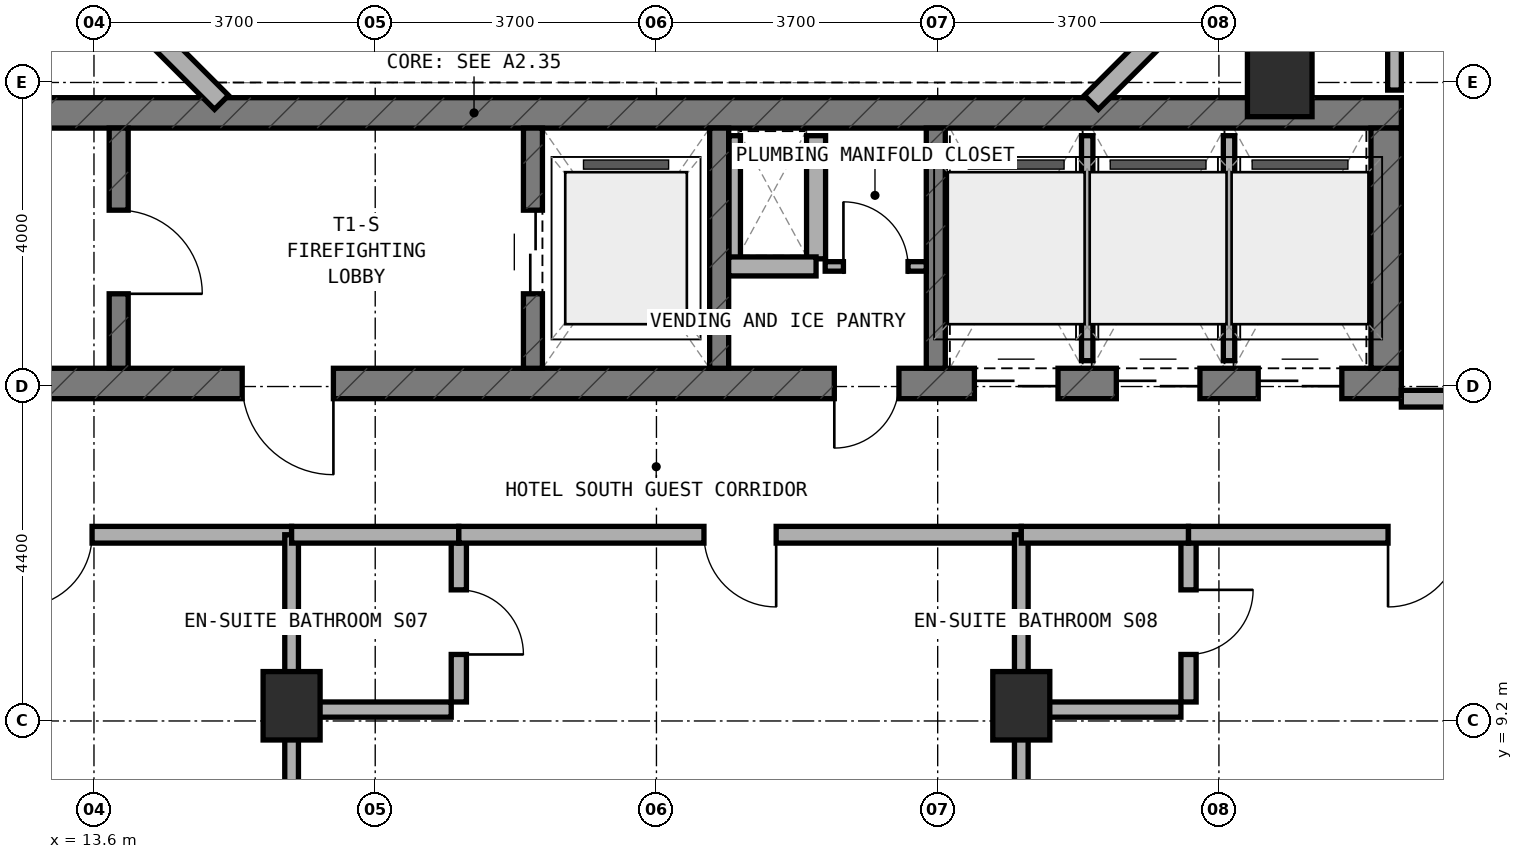
"""IFC4 building model, lengths in metres.
Left out: names, types, materials, properties, quantities, classifications, styles, units other than length and angle.
Written with IfcOpenShell. Run it as: python <this file> out.ifc"""

import sys

from ifc_helpers import new_model, si_unit, direction, frame, frame_2d, origin, origin_2d, place, context, subcontext, project, spatial, rectangle, extrude, element, fill, save


model = new_model("IFC4")
c1 = context("Model", 3, precision=1e-05, world=origin(), true_north=direction((0.0, 1.0)))
c2 = subcontext(c1, "Body", "Model", "MODEL_VIEW")
j1 = project(units=[si_unit("LENGTHUNIT", "METRE"), si_unit("PLANEANGLEUNIT", "RADIAN")], contexts=[c1])
p1 = place(None, origin())
s1 = spatial("IfcSite", under=j1, at=p1, CompositionType="ELEMENT")
p2 = place(p1, origin())
s2 = spatial("IfcBuilding", under=s1, at=p2, CompositionType="ELEMENT")
p3 = place(p2, frame((0.0, 0.0, 155.5)))
s3 = spatial("IfcBuildingStorey", under=s2, at=p3, CompositionType="ELEMENT", Elevation=155.5)
p4 = place(p3, frame((6.4, 13.64, 0.0), z_axis=(0.0, 0.0, 1.0), x_axis=(1.0, 0.0, 0.0)))
e1 = element("IfcWall", 1, at=p4, inside=s3, PredefinedType="SHEAR", context=c2, shape_type="SweptSolid", body=[
    extrude(rectangle(XDim=24.4, YDim=0.4, at=frame_2d((12.2, 0.0))), origin(), (0.0, 0.0, 1.0), 3.5),
])
p5 = place(p4, frame((9.15, 0.0, 0.0)))
e2 = element("IfcOpeningElement", 2, at=p5, cuts=e1, PredefinedType="OPENING", context=c2, shape_type="SweptSolid", body=[
    extrude(rectangle(XDim=1.2, YDim=2.15, at=frame_2d((0.6, 1.075))), frame((0.0, 0.21, 0.0), z_axis=(0.0, -1.0, 0.0), x_axis=(1.0, 0.0, 0.0)), (0.0, 0.0, 1.0), 0.42),
])
p6 = place(p4, frame((16.94, 0.0, 0.0)))
e3 = element("IfcOpeningElement", 3, at=p6, cuts=e1, PredefinedType="OPENING", context=c2, shape_type="SweptSolid", body=[
    extrude(rectangle(XDim=0.85, YDim=2.1, at=frame_2d((0.425, 1.05))), frame((0.0, 0.21, 0.0), z_axis=(0.0, -1.0, 0.0), x_axis=(1.0, 0.0, 0.0)), (0.0, 0.0, 1.0), 0.42),
])
p7 = place(p4, frame((18.783, 0.0, 0.0)))
e4 = element("IfcOpeningElement", 4, at=p7, cuts=e1, PredefinedType="OPENING", context=c2, shape_type="SweptSolid", body=[
    extrude(rectangle(XDim=1.1, YDim=2.15, at=frame_2d((0.55, 1.075))), frame((0.0, 0.21, 0.0), z_axis=(0.0, -1.0, 0.0), x_axis=(1.0, 0.0, 0.0)), (0.0, 0.0, 1.0), 0.42),
])
p8 = place(p4, frame((20.65, 0.0, 0.0)))
e5 = element("IfcOpeningElement", 5, at=p8, cuts=e1, PredefinedType="OPENING", context=c2, shape_type="SweptSolid", body=[
    extrude(rectangle(XDim=1.1, YDim=2.15, at=frame_2d((0.55, 1.075))), frame((0.0, 0.21, 0.0), z_axis=(0.0, -1.0, 0.0), x_axis=(1.0, 0.0, 0.0)), (0.0, 0.0, 1.0), 0.42),
])
p9 = place(p4, frame((22.517, 0.0, 0.0)))
e6 = element("IfcOpeningElement", 6, at=p9, cuts=e1, PredefinedType="OPENING", context=c2, shape_type="SweptSolid", body=[
    extrude(rectangle(XDim=1.1, YDim=2.15, at=frame_2d((0.55, 1.075))), frame((0.0, 0.21, 0.0), z_axis=(0.0, -1.0, 0.0), x_axis=(1.0, 0.0, 0.0)), (0.0, 0.0, 1.0), 0.42),
])
p10 = place(p3, frame((6.4, 17.2, 0.0), z_axis=(0.0, 0.0, 1.0), x_axis=(1.0, 0.0, 0.0)))
e7 = element("IfcWall", 7, at=p10, inside=s3, PredefinedType="SHEAR", context=c2, shape_type="SweptSolid", body=[
    extrude(rectangle(XDim=24.4, YDim=0.4, at=frame_2d((12.2, 0.0))), origin(), (0.0, 0.0, 1.0), 3.5),
])
p11 = place(p3, frame((30.6, 13.84, 0.0), z_axis=(0.0, 0.0, 1.0), x_axis=(0.0, 1.0, 0.0)))
e8 = element("IfcWall", 8, at=p11, inside=s3, PredefinedType="SHEAR", context=c2, shape_type="SweptSolid", body=[
    extrude(rectangle(XDim=3.16, YDim=0.4, at=frame_2d((1.58, 0.0))), origin(), (0.0, 0.0, 1.0), 3.5),
])
p12 = place(p3, frame((13.925, 13.84, 0.0), z_axis=(0.0, 0.0, 1.0), x_axis=(0.0, 1.0, 0.0)))
e9 = element("IfcWall", 9, at=p12, inside=s3, PredefinedType="STANDARD", context=c2, shape_type="SweptSolid", body=[
    extrude(rectangle(XDim=3.16, YDim=0.25, at=frame_2d((1.58, 0.0))), origin(), (0.0, 0.0, 1.0), 3.22),
])
p13 = place(p12, frame((0.98, 0.0, 0.0)))
e10 = element("IfcOpeningElement", 10, at=p13, cuts=e9, PredefinedType="OPENING", context=c2, shape_type="SweptSolid", body=[
    extrude(rectangle(XDim=1.1, YDim=2.15, at=frame_2d((0.55, 1.075))), frame((0.0, 0.135, 0.0), z_axis=(0.0, -1.0, 0.0), x_axis=(1.0, 0.0, 0.0)), (0.0, 0.0, 1.0), 0.27),
])
p14 = place(p3, frame((19.375, 13.84, 0.0), z_axis=(0.0, 0.0, 1.0), x_axis=(0.0, 1.0, 0.0)))
e11 = element("IfcWall", 11, at=p14, inside=s3, PredefinedType="STANDARD", context=c2, shape_type="SweptSolid", body=[
    extrude(rectangle(XDim=3.16, YDim=0.25, at=frame_2d((1.58, 0.0))), origin(), (0.0, 0.0, 1.0), 3.22),
])
p15 = place(p14, frame((0.98, 0.0, 0.0)))
e12 = element("IfcOpeningElement", 12, at=p15, cuts=e11, PredefinedType="OPENING", context=c2, shape_type="SweptSolid", body=[
    extrude(rectangle(XDim=1.1, YDim=2.15, at=frame_2d((0.55, 1.075))), frame((0.0, 0.135, 0.0), z_axis=(0.0, -1.0, 0.0), x_axis=(1.0, 0.0, 0.0)), (0.0, 0.0, 1.0), 0.27),
])
for number, where, z_axis, x_axis in (
    (13, (21.825, 13.84, 0.0), (0.0, 0.0, 1.0), (0.0, 1.0, 0.0)),
    (14, (24.675, 13.84, 0.0), (0.0, 0.0, 1.0), (0.0, 1.0, 0.0)),
):
    element("IfcWall", number, at=place(p3, frame(where, z_axis=z_axis, x_axis=x_axis)), inside=s3, PredefinedType="STANDARD", context=c2, shape_type="SweptSolid", body=[
        extrude(rectangle(XDim=3.16, YDim=0.25, at=frame_2d((1.58, 0.0))), origin(), (0.0, 0.0, 1.0), 3.22),
    ])
for number, where, z_axis, x_axis in (
    (15, (16.2, 9.4, 0.0), (0.0, 0.0, 1.0), (1.0, 0.0, 0.0)),
    (16, (25.8, 9.4, 0.0), (0.0, 0.0, 1.0), (1.0, 0.0, 0.0)),
):
    element("IfcColumn", number, at=place(p3, frame(where, z_axis=z_axis, x_axis=x_axis)), inside=s3, PredefinedType="COLUMN", context=c2, shape_type="SweptSolid", body=[
        extrude(rectangle(XDim=0.75, YDim=0.9, at=origin_2d()), origin(), (0.0, 0.0, 1.0), 3.5),
    ])
p16 = place(p3, frame((29.2, 17.65, 0.0), z_axis=(0.0, 0.0, 1.0), x_axis=(1.0, 0.0, 0.0)))
e17 = element("IfcColumn", 17, at=p16, inside=s3, PredefinedType="COLUMN", context=c2, shape_type="SweptSolid", body=[
    extrude(rectangle(XDim=0.85, YDim=1.0, at=origin_2d()), origin(), (0.0, 0.0, 1.0), 3.5),
])
for number, where, z_axis, x_axis in (
    (18, (26.722, 17.338, 0.0), (0.0, 0.0, 1.0), (0.707, 0.707, 0.0)),
    (19, (13.444, 19.172, 0.0), (0.0, 0.0, 1.0), (0.707, -0.707, 0.0)),
):
    element("IfcWall", number, at=place(p3, frame(where, z_axis=z_axis, x_axis=x_axis)), inside=s3, PredefinedType="STANDARD", context=c2, shape_type="SweptSolid", body=[
        extrude(rectangle(XDim=2.594, YDim=0.26, at=frame_2d((1.297, 0.0))), origin(), (0.0, 0.0, 1.0), 3.22),
    ])
p17 = place(p3, frame((22.03, 15.28, 0.0), z_axis=(0.0, 0.0, 1.0), x_axis=(0.0, 1.0, 0.0)))
e20 = element("IfcWall", 20, at=p17, inside=s3, PredefinedType="PARTITIONING", context=c2, shape_type="SweptSolid", body=[
    extrude(rectangle(XDim=1.62, YDim=0.15, at=frame_2d((0.81, 0.0))), origin(), (0.0, 0.0, 1.0), 3.22),
])
p18 = place(p3, frame((23.1, 15.28, 0.0), z_axis=(0.0, 0.0, 1.0), x_axis=(0.0, 1.0, 0.0)))
e21 = element("IfcWall", 21, at=p18, inside=s3, PredefinedType="SOLIDWALL", context=c2, shape_type="SweptSolid", body=[
    extrude(rectangle(XDim=1.62, YDim=0.25, at=frame_2d((0.81, 0.0))), origin(), (0.0, 0.0, 1.0), 3.22),
])
p19 = place(p3, frame((21.95, 15.18, 0.0), z_axis=(0.0, 0.0, 1.0), x_axis=(1.0, 0.0, 0.0)))
e22 = element("IfcWall", 22, at=p19, inside=s3, PredefinedType="SOLIDWALL", context=c2, shape_type="SweptSolid", body=[
    extrude(rectangle(XDim=1.15, YDim=0.25, at=frame_2d((0.575, 0.0))), origin(), (0.0, 0.0, 1.0), 3.22),
])
p20 = place(p3, frame((23.22, 15.18, 0.0), z_axis=(0.0, 0.0, 1.0), x_axis=(1.0, 0.0, 0.0)))
e23 = element("IfcWall", 23, at=p20, inside=s3, PredefinedType="PARTITIONING", context=c2, shape_type="SweptSolid", body=[
    extrude(rectangle(XDim=1.33, YDim=0.125, at=frame_2d((0.665, 0.0))), origin(), (0.0, 0.0, 1.0), 3.22),
])
p21 = place(p20, frame((0.24, 0.0, 0.0)))
e24 = element("IfcOpeningElement", 24, at=p21, cuts=e23, PredefinedType="OPENING", context=c2, shape_type="SweptSolid", body=[
    extrude(rectangle(XDim=0.85, YDim=2.1, at=frame_2d((0.425, 1.05))), frame((0.0, 0.073, 0.0), z_axis=(0.0, -1.0, 0.0), x_axis=(1.0, 0.0, 0.0)), (0.0, 0.0, 1.0), 0.145),
])
p22 = place(p3, frame((26.667, 13.94, 0.0), z_axis=(0.0, 0.0, 1.0), x_axis=(0.0, 1.0, 0.0)))
e25 = element("IfcWall", 25, at=p22, inside=s3, PredefinedType="PARTITIONING", context=c2, shape_type="SweptSolid", body=[
    extrude(rectangle(XDim=2.96, YDim=0.15, at=frame_2d((1.48, 0.0))), origin(), (0.0, 0.0, 1.0), 3.22),
])
p23 = place(p3, frame((28.533, 13.94, 0.0), z_axis=(0.0, 0.0, 1.0), x_axis=(0.0, 1.0, 0.0)))
e26 = element("IfcWall", 26, at=p23, inside=s3, PredefinedType="PARTITIONING", context=c2, shape_type="SweptSolid", body=[
    extrude(rectangle(XDim=2.96, YDim=0.15, at=frame_2d((1.48, 0.0))), origin(), (0.0, 0.0, 1.0), 2.795),
])
p24 = place(p3, frame((10.0, 11.65, 0.0), z_axis=(0.0, 0.0, 1.0), x_axis=(1.0, 0.0, 0.0)))
e27 = element("IfcWall", 27, at=p24, inside=s3, PredefinedType="SOLIDWALL", context=c2, shape_type="SweptSolid", body=[
    extrude(rectangle(XDim=6.2, YDim=0.22, at=frame_2d((3.1, 0.0))), origin(), (0.0, 0.0, 1.0), 2.795),
])
p25 = place(p24, frame((2.625, 0.0, 0.0)))
e28 = element("IfcOpeningElement", 28, at=p25, cuts=e27, PredefinedType="OPENING", context=c2, shape_type="SweptSolid", body=[
    extrude(rectangle(XDim=0.95, YDim=2.1, at=frame_2d((0.475, 1.05))), frame((0.0, 0.12, 0.0), z_axis=(0.0, -1.0, 0.0), x_axis=(1.0, 0.0, 0.0)), (0.0, 0.0, 1.0), 0.24),
])
p26 = place(p3, frame((16.2, 4.86, 0.0), z_axis=(0.0, 0.0, 1.0), x_axis=(0.0, 1.0, 0.0)))
e29 = element("IfcWall", 29, at=p26, inside=s3, PredefinedType="SOLIDWALL", context=c2, shape_type="SweptSolid", body=[
    extrude(rectangle(XDim=6.79, YDim=0.18, at=frame_2d((3.395, 0.0))), origin(), (0.0, 0.0, 1.0), 2.795),
])
p27 = place(p3, frame((18.4, 9.45, 0.0), z_axis=(0.0, 0.0, 1.0), x_axis=(0.0, 1.0, 0.0)))
e30 = element("IfcWall", 30, at=p27, inside=s3, PredefinedType="PLUMBINGWALL", context=c2, shape_type="SweptSolid", body=[
    extrude(rectangle(XDim=2.1, YDim=0.2, at=frame_2d((1.05, 0.0))), origin(), (0.0, 0.0, 1.0), 2.795),
])
p28 = place(p27, frame((0.625, 0.0, 0.0)))
e31 = element("IfcOpeningElement", 31, at=p28, cuts=e30, PredefinedType="OPENING", context=c2, shape_type="SweptSolid", body=[
    extrude(rectangle(XDim=0.85, YDim=2.1, at=frame_2d((0.425, 1.05))), frame((0.0, 0.11, 0.0), z_axis=(0.0, -1.0, 0.0), x_axis=(1.0, 0.0, 0.0)), (0.0, 0.0, 1.0), 0.22),
])
p29 = place(p3, frame((16.3, 9.35, 0.0), z_axis=(0.0, 0.0, 1.0), x_axis=(1.0, 0.0, 0.0)))
e32 = element("IfcWall", 32, at=p29, inside=s3, PredefinedType="PLUMBINGWALL", context=c2, shape_type="SweptSolid", body=[
    extrude(rectangle(XDim=2.0, YDim=0.2, at=frame_2d((1.0, 0.0))), origin(), (0.0, 0.0, 1.0), 2.835),
])
p30 = place(p3, frame((16.2, 11.65, 0.0), z_axis=(0.0, 0.0, 1.0), x_axis=(1.0, 0.0, 0.0)))
e33 = element("IfcWall", 33, at=p30, inside=s3, PredefinedType="SOLIDWALL", context=c2, shape_type="SweptSolid", body=[
    extrude(rectangle(XDim=2.2, YDim=0.22, at=frame_2d((1.1, 0.0))), origin(), (0.0, 0.0, 1.0), 2.795),
])
p31 = place(p3, frame((18.4, 11.65, 0.0), z_axis=(0.0, 0.0, 1.0), x_axis=(1.0, 0.0, 0.0)))
e34 = element("IfcWall", 34, at=p31, inside=s3, PredefinedType="SOLIDWALL", context=c2, shape_type="SweptSolid", body=[
    extrude(rectangle(XDim=7.4, YDim=0.22, at=frame_2d((3.7, 0.0))), origin(), (0.0, 0.0, 1.0), 2.795),
])
p32 = place(p31, frame((3.225, 0.0, 0.0)))
e35 = element("IfcOpeningElement", 35, at=p32, cuts=e34, PredefinedType="OPENING", context=c2, shape_type="SweptSolid", body=[
    extrude(rectangle(XDim=0.95, YDim=2.1, at=frame_2d((0.475, 1.05))), frame((0.0, 0.12, 0.0), z_axis=(0.0, -1.0, 0.0), x_axis=(1.0, 0.0, 0.0)), (0.0, 0.0, 1.0), 0.24),
])
p33 = place(p3, frame((25.8, 4.86, 0.0), z_axis=(0.0, 0.0, 1.0), x_axis=(0.0, 1.0, 0.0)))
e36 = element("IfcWall", 36, at=p33, inside=s3, PredefinedType="SOLIDWALL", context=c2, shape_type="SweptSolid", body=[
    extrude(rectangle(XDim=6.79, YDim=0.18, at=frame_2d((3.395, 0.0))), origin(), (0.0, 0.0, 1.0), 2.795),
])
p34 = place(p3, frame((28.0, 9.45, 0.0), z_axis=(0.0, 0.0, 1.0), x_axis=(0.0, 1.0, 0.0)))
e37 = element("IfcWall", 37, at=p34, inside=s3, PredefinedType="PLUMBINGWALL", context=c2, shape_type="SweptSolid", body=[
    extrude(rectangle(XDim=2.1, YDim=0.2, at=frame_2d((1.05, 0.0))), origin(), (0.0, 0.0, 1.0), 2.795),
])
p35 = place(p34, frame((0.625, 0.0, 0.0)))
e38 = element("IfcOpeningElement", 38, at=p35, cuts=e37, PredefinedType="OPENING", context=c2, shape_type="SweptSolid", body=[
    extrude(rectangle(XDim=0.85, YDim=2.1, at=frame_2d((0.425, 1.05))), frame((0.0, 0.11, 0.0), z_axis=(0.0, -1.0, 0.0), x_axis=(1.0, 0.0, 0.0)), (0.0, 0.0, 1.0), 0.22),
])
p36 = place(p3, frame((25.9, 9.35, 0.0), z_axis=(0.0, 0.0, 1.0), x_axis=(1.0, 0.0, 0.0)))
e39 = element("IfcWall", 39, at=p36, inside=s3, PredefinedType="PLUMBINGWALL", context=c2, shape_type="SweptSolid", body=[
    extrude(rectangle(XDim=2.0, YDim=0.2, at=frame_2d((1.0, 0.0))), origin(), (0.0, 0.0, 1.0), 2.835),
])
p37 = place(p3, frame((25.8, 11.65, 0.0), z_axis=(0.0, 0.0, 1.0), x_axis=(1.0, 0.0, 0.0)))
e40 = element("IfcWall", 40, at=p37, inside=s3, PredefinedType="SOLIDWALL", context=c2, shape_type="SweptSolid", body=[
    extrude(rectangle(XDim=2.2, YDim=0.22, at=frame_2d((1.1, 0.0))), origin(), (0.0, 0.0, 1.0), 2.795),
])
p38 = place(p3, frame((28.0, 11.65, 0.0), z_axis=(0.0, 0.0, 1.0), x_axis=(1.0, 0.0, 0.0)))
e41 = element("IfcWall", 41, at=p38, inside=s3, PredefinedType="SOLIDWALL", context=c2, shape_type="SweptSolid", body=[
    extrude(rectangle(XDim=6.2, YDim=0.22, at=frame_2d((3.1, 0.0))), origin(), (0.0, 0.0, 1.0), 2.795),
])
p39 = place(p38, frame((2.625, 0.0, 0.0)))
e42 = element("IfcOpeningElement", 42, at=p39, cuts=e41, PredefinedType="OPENING", context=c2, shape_type="SweptSolid", body=[
    extrude(rectangle(XDim=0.95, YDim=2.1, at=frame_2d((0.475, 1.05))), frame((0.0, 0.12, 0.0), z_axis=(0.0, -1.0, 0.0), x_axis=(1.0, 0.0, 0.0)), (0.0, 0.0, 1.0), 0.24),
])
p40 = place(p3, frame((30.71, 17.5, 0.0), z_axis=(0.0, 0.0, 1.0), x_axis=(0.0, 1.0, 0.0)))
e43 = element("IfcWall", 43, at=p40, inside=s3, PredefinedType="SOLIDWALL", context=c2, shape_type="SweptSolid", body=[
    extrude(rectangle(XDim=15.0, YDim=0.18, at=frame_2d((7.5, 0.0))), origin(), (0.0, 0.0, 1.0), 2.795),
])
p41 = place(p3, frame((30.8, 13.44, 0.0), z_axis=(0.0, 0.0, 1.0), x_axis=(1.0, 0.0, 0.0)))
e44 = element("IfcWall", 44, at=p41, inside=s3, PredefinedType="SOLIDWALL", context=c2, shape_type="SweptSolid", body=[
    extrude(rectangle(XDim=5.65, YDim=0.22, at=frame_2d((2.825, 0.0))), origin(), (0.0, 0.0, 1.0), 2.795),
])
p42 = place(p41, frame((2.35, 0.0, 0.0)))
e45 = element("IfcOpeningElement", 45, at=p42, cuts=e44, PredefinedType="OPENING", context=c2, shape_type="SweptSolid", body=[
    extrude(rectangle(XDim=0.95, YDim=2.1, at=frame_2d((0.475, 1.05))), frame((0.0, 0.12, 0.0), z_axis=(0.0, -1.0, 0.0), x_axis=(1.0, 0.0, 0.0)), (0.0, 0.0, 1.0), 0.24),
])
p43 = place(p13, frame((1.1, 0.0, 0.0), z_axis=(0.0, 0.0, 1.0), x_axis=(-1.0, 0.0, 0.0)))
e46 = element("IfcDoor", 46, at=p43, inside=s3, OperationType="SINGLE_SWING_RIGHT", PredefinedType="DOOR", context=c2, shape_type="SweptSolid", body=[
    extrude(rectangle(XDim=1.1, YDim=2.15, at=frame_2d((0.55, 1.075))), frame((0.0, 0.025, 0.0), z_axis=(0.0, -1.0, 0.0), x_axis=(1.0, 0.0, 0.0)), (0.0, 0.0, 1.0), 0.05),
])
fill(e10, e46)
p44 = place(p5, frame((1.2, 0.0, 0.0), z_axis=(0.0, 0.0, 1.0), x_axis=(-1.0, 0.0, 0.0)))
e47 = element("IfcDoor", 47, at=p44, inside=s3, OperationType="SINGLE_SWING_LEFT", PredefinedType="DOOR", context=c2, shape_type="SweptSolid", body=[
    extrude(rectangle(XDim=1.2, YDim=2.15, at=frame_2d((0.6, 1.075))), frame((0.0, 0.025, 0.0), z_axis=(0.0, -1.0, 0.0), x_axis=(1.0, 0.0, 0.0)), (0.0, 0.0, 1.0), 0.05),
])
fill(e2, e47)
p45 = place(p15, origin())
e48 = element("IfcDoor", 48, at=p45, inside=s3, OperationType="DOUBLE_DOOR_SLIDING", PredefinedType="DOOR", context=c2, shape_type="SweptSolid", body=[
    extrude(rectangle(XDim=1.1, YDim=2.15, at=frame_2d((0.55, 1.075))), frame((0.0, 0.025, 0.0), z_axis=(0.0, -1.0, 0.0), x_axis=(1.0, 0.0, 0.0)), (0.0, 0.0, 1.0), 0.05),
])
fill(e12, e48)
p46 = place(p6, frame((0.85, 0.0, 0.0), z_axis=(0.0, 0.0, 1.0), x_axis=(-1.0, 0.0, 0.0)))
e49 = element("IfcDoor", 49, at=p46, inside=s3, OperationType="SINGLE_SWING_RIGHT", PredefinedType="DOOR", context=c2, shape_type="SweptSolid", body=[
    extrude(rectangle(XDim=0.85, YDim=2.1, at=frame_2d((0.425, 1.05))), frame((0.0, 0.025, 0.0), z_axis=(0.0, -1.0, 0.0), x_axis=(1.0, 0.0, 0.0)), (0.0, 0.0, 1.0), 0.05),
])
fill(e3, e49)
p47 = place(p7, frame((1.1, 0.0, 0.0), z_axis=(0.0, 0.0, 1.0), x_axis=(-1.0, 0.0, 0.0)))
e50 = element("IfcDoor", 50, at=p47, inside=s3, OperationType="DOUBLE_DOOR_SLIDING", PredefinedType="DOOR", context=c2, shape_type="SweptSolid", body=[
    extrude(rectangle(XDim=1.1, YDim=2.15, at=frame_2d((0.55, 1.075))), frame((0.0, 0.025, 0.0), z_axis=(0.0, -1.0, 0.0), x_axis=(1.0, 0.0, 0.0)), (0.0, 0.0, 1.0), 0.05),
])
fill(e4, e50)
p48 = place(p8, frame((1.1, 0.0, 0.0), z_axis=(0.0, 0.0, 1.0), x_axis=(-1.0, 0.0, 0.0)))
e51 = element("IfcDoor", 51, at=p48, inside=s3, OperationType="DOUBLE_DOOR_SLIDING", PredefinedType="DOOR", context=c2, shape_type="SweptSolid", body=[
    extrude(rectangle(XDim=1.1, YDim=2.15, at=frame_2d((0.55, 1.075))), frame((0.0, 0.025, 0.0), z_axis=(0.0, -1.0, 0.0), x_axis=(1.0, 0.0, 0.0)), (0.0, 0.0, 1.0), 0.05),
])
fill(e5, e51)
p49 = place(p9, frame((1.1, 0.0, 0.0), z_axis=(0.0, 0.0, 1.0), x_axis=(-1.0, 0.0, 0.0)))
e52 = element("IfcDoor", 52, at=p49, inside=s3, OperationType="DOUBLE_DOOR_SLIDING", PredefinedType="DOOR", context=c2, shape_type="SweptSolid", body=[
    extrude(rectangle(XDim=1.1, YDim=2.15, at=frame_2d((0.55, 1.075))), frame((0.0, 0.025, 0.0), z_axis=(0.0, -1.0, 0.0), x_axis=(1.0, 0.0, 0.0)), (0.0, 0.0, 1.0), 0.05),
])
fill(e6, e52)
p50 = place(p21, origin())
e53 = element("IfcDoor", 53, at=p50, inside=s3, OperationType="SINGLE_SWING_LEFT", PredefinedType="DOOR", context=c2, shape_type="SweptSolid", body=[
    extrude(rectangle(XDim=0.85, YDim=2.1, at=frame_2d((0.425, 1.05))), frame((0.0, 0.025, 0.0), z_axis=(0.0, -1.0, 0.0), x_axis=(1.0, 0.0, 0.0)), (0.0, 0.0, 1.0), 0.05),
])
fill(e24, e53)
p51 = place(p25, frame((0.95, 0.0, 0.0), z_axis=(0.0, 0.0, 1.0), x_axis=(-1.0, 0.0, 0.0)))
e54 = element("IfcDoor", 54, at=p51, inside=s3, OperationType="SINGLE_SWING_RIGHT", PredefinedType="DOOR", context=c2, shape_type="SweptSolid", body=[
    extrude(rectangle(XDim=0.95, YDim=2.1, at=frame_2d((0.475, 1.05))), frame((0.0, 0.025, 0.0), z_axis=(0.0, -1.0, 0.0), x_axis=(1.0, 0.0, 0.0)), (0.0, 0.0, 1.0), 0.05),
])
fill(e28, e54)
p52 = place(p28, frame((0.85, 0.0, 0.0), z_axis=(0.0, 0.0, 1.0), x_axis=(-1.0, 0.0, 0.0)))
e55 = element("IfcDoor", 55, at=p52, inside=s3, OperationType="SINGLE_SWING_RIGHT", PredefinedType="DOOR", context=c2, shape_type="SweptSolid", body=[
    extrude(rectangle(XDim=0.85, YDim=2.1, at=frame_2d((0.425, 1.05))), frame((0.0, 0.025, 0.0), z_axis=(0.0, -1.0, 0.0), x_axis=(1.0, 0.0, 0.0)), (0.0, 0.0, 1.0), 0.05),
])
fill(e31, e55)
p53 = place(p32, frame((0.95, 0.0, 0.0), z_axis=(0.0, 0.0, 1.0), x_axis=(-1.0, 0.0, 0.0)))
e56 = element("IfcDoor", 56, at=p53, inside=s3, OperationType="SINGLE_SWING_LEFT", PredefinedType="DOOR", context=c2, shape_type="SweptSolid", body=[
    extrude(rectangle(XDim=0.95, YDim=2.1, at=frame_2d((0.475, 1.05))), frame((0.0, 0.025, 0.0), z_axis=(0.0, -1.0, 0.0), x_axis=(1.0, 0.0, 0.0)), (0.0, 0.0, 1.0), 0.05),
])
fill(e35, e56)
p54 = place(p35, frame((0.85, 0.0, 0.0), z_axis=(0.0, 0.0, 1.0), x_axis=(-1.0, 0.0, 0.0)))
e57 = element("IfcDoor", 57, at=p54, inside=s3, OperationType="SINGLE_SWING_LEFT", PredefinedType="DOOR", context=c2, shape_type="SweptSolid", body=[
    extrude(rectangle(XDim=0.85, YDim=2.1, at=frame_2d((0.425, 1.05))), frame((0.0, 0.025, 0.0), z_axis=(0.0, -1.0, 0.0), x_axis=(1.0, 0.0, 0.0)), (0.0, 0.0, 1.0), 0.05),
])
fill(e38, e57)
p55 = place(p39, frame((0.95, 0.0, 0.0), z_axis=(0.0, 0.0, 1.0), x_axis=(-1.0, 0.0, 0.0)))
e58 = element("IfcDoor", 58, at=p55, inside=s3, OperationType="SINGLE_SWING_RIGHT", PredefinedType="DOOR", context=c2, shape_type="SweptSolid", body=[
    extrude(rectangle(XDim=0.95, YDim=2.1, at=frame_2d((0.475, 1.05))), frame((0.0, 0.025, 0.0), z_axis=(0.0, -1.0, 0.0), x_axis=(1.0, 0.0, 0.0)), (0.0, 0.0, 1.0), 0.05),
])
fill(e42, e58)
save(model, sys.argv[1])
